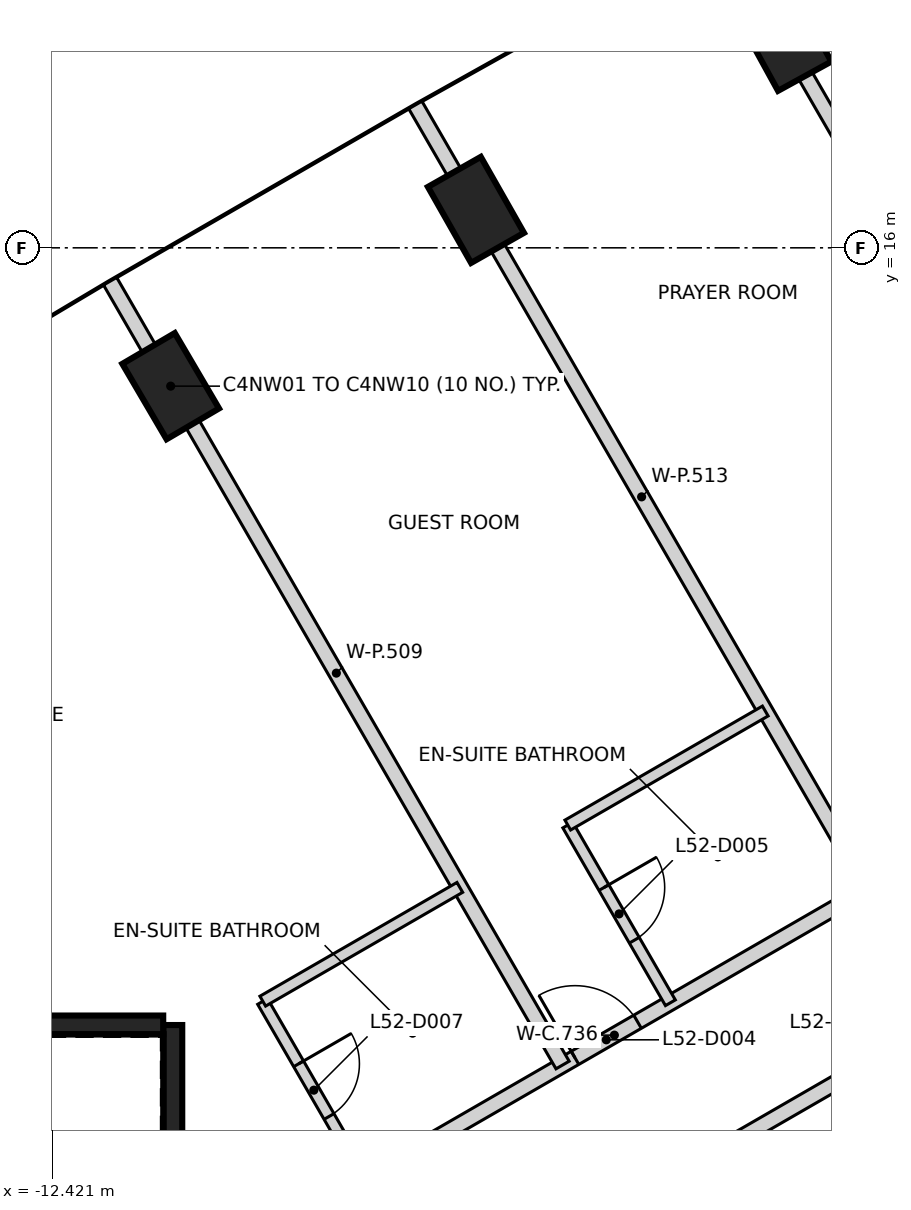
"""IFC4 building model, lengths in metres.
Left out: names, types, materials, properties, quantities, classifications, styles, units other than length and angle.
Written with IfcOpenShell. Run it as: python <this file> out.ifc"""

import sys

from ifc_helpers import new_model, si_unit, direction, frame, frame_2d, origin, origin_2d, place, context, subcontext, project, spatial, rectangle, extrude, element, fill, save


model = new_model("IFC4")
c1 = context("Model", 3, precision=1e-05, world=origin(), true_north=direction((0.0, 1.0)))
c2 = subcontext(c1, "Body", "Model", "MODEL_VIEW")
j1 = project(units=[si_unit("LENGTHUNIT", "METRE"), si_unit("PLANEANGLEUNIT", "RADIAN")], contexts=[c1])
p1 = place(None, origin())
s1 = spatial("IfcSite", under=j1, at=p1, CompositionType="ELEMENT")
p2 = place(p1, origin())
s2 = spatial("IfcBuilding", under=s1, at=p2, CompositionType="ELEMENT")
p3 = place(p2, frame((0.0, 0.0, 208.0)))
s3 = spatial("IfcBuildingStorey", under=s2, at=p3, CompositionType="ELEMENT", Elevation=208.0)
for number, where, z_axis, x_axis in (
    (1, (-2.8, 18.762, -0.35), (0.0, 0.0, 1.0), (-0.482, 0.876, 0.0)),
    (2, (-6.848, 16.499, -0.35), (0.0, 0.0, 1.0), (-0.494, 0.87, 0.0)),
    (3, (-10.864, 14.18, -0.35), (0.0, 0.0, 1.0), (-0.506, 0.862, 0.0)),
):
    element("IfcColumn", number, at=place(p3, frame(where, z_axis=z_axis, x_axis=x_axis)), inside=s3, PredefinedType="COLUMN", context=c2, shape_type="SweptSolid", body=[
        extrude(rectangle(XDim=1.15, YDim=0.8, at=origin_2d()), origin(), (0.0, 0.0, 1.0), 2.736),
    ])
p4 = place(p3, frame((-10.837, 5.775, 0.0), z_axis=(0.0, 0.0, 1.0), x_axis=(0.0, -1.0, 0.0)))
e4 = element("IfcWall", 4, at=p4, inside=s3, PredefinedType="SHEAR", context=c2, shape_type="SweptSolid", body=[
    extrude(rectangle(XDim=11.55, YDim=0.25, at=frame_2d((5.775, 0.0))), origin(), (0.0, 0.0, 1.0), 3.2),
])
p5 = place(p4, frame((10.025, 0.0, 0.0)))
e5 = element("IfcOpeningElement", 5, at=p5, cuts=e4, PredefinedType="OPENING", context=c2, shape_type="SweptSolid", body=[
    extrude(rectangle(XDim=1.2, YDim=2.1, at=frame_2d((0.6, 1.05))), frame((0.0, 0.135, 0.0), z_axis=(0.0, -1.0, 0.0), x_axis=(1.0, 0.0, 0.0)), (0.0, 0.0, 1.0), 0.27),
])
p6 = place(p4, frame((8.725, 0.0, 0.0)))
e6 = element("IfcOpeningElement", 6, at=p6, cuts=e4, PredefinedType="OPENING", context=c2, shape_type="SweptSolid", body=[
    extrude(rectangle(XDim=1.2, YDim=2.1, at=frame_2d((0.6, 1.05))), frame((0.0, 0.135, 0.0), z_axis=(0.0, -1.0, 0.0), x_axis=(1.0, 0.0, 0.0)), (0.0, 0.0, 1.0), 0.27),
])
p7 = place(p3, frame((-16.472, 5.775, 0.0), z_axis=(0.0, 0.0, 1.0), x_axis=(1.0, 0.0, 0.0)))
e7 = element("IfcWall", 7, at=p7, inside=s3, PredefinedType="SHEAR", context=c2, shape_type="SweptSolid", body=[
    extrude(rectangle(XDim=5.51, YDim=0.25, at=frame_2d((2.755, 0.0))), origin(), (0.0, 0.0, 1.0), 3.2),
])
p8 = place(p3, frame((-10.652, 2.394, 0.0), z_axis=(0.0, 0.0, 1.0), x_axis=(0.866016271077, 0.500015817979, 0.0)))
e8 = element("IfcWall", 8, at=p8, inside=s3, PredefinedType="PARTITIONING", context=c2, shape_type="SweptSolid", body=[
    extrude(rectangle(XDim=12.991, YDim=0.2, at=frame_2d((6.495, 0.0))), origin(), (0.0, 0.0, 1.0), 3.2),
])
p9 = place(p8, frame((5.898, 0.0, 0.0)))
e9 = element("IfcOpeningElement", 9, at=p9, cuts=e8, PredefinedType="OPENING", context=c2, shape_type="SweptSolid", body=[
    extrude(rectangle(XDim=0.95, YDim=2.1, at=frame_2d((0.475, 1.05))), frame((0.0, 0.11, 0.0), z_axis=(0.0, -1.0, 0.0), x_axis=(1.0, 0.0, 0.0)), (0.0, 0.0, 1.0), 0.22),
])
p10 = place(p8, frame((1.571, 0.0, 0.0)))
e10 = element("IfcOpeningElement", 10, at=p10, cuts=e8, PredefinedType="OPENING", context=c2, shape_type="SweptSolid", body=[
    extrude(rectangle(XDim=0.95, YDim=2.1, at=frame_2d((0.475, 1.05))), frame((0.0, 0.11, 0.0), z_axis=(0.0, -1.0, 0.0), x_axis=(1.0, 0.0, 0.0)), (0.0, 0.0, 1.0), 0.22),
])
p11 = place(p3, frame((-4.718, 3.511, 0.0), z_axis=(0.0, 0.0, 1.0), x_axis=(0.865989775611, 0.500061704731, 0.0)))
e11 = element("IfcWall", 11, at=p11, inside=s3, PredefinedType="PARTITIONING", context=c2, shape_type="SweptSolid", body=[
    extrude(rectangle(XDim=9.157, YDim=0.2, at=frame_2d((4.579, 0.0))), origin(), (0.0, 0.0, 1.0), 3.2),
])
p12 = place(p11, frame((4.128, 0.0, 0.0)))
e12 = element("IfcOpeningElement", 12, at=p12, cuts=e11, PredefinedType="OPENING", context=c2, shape_type="SweptSolid", body=[
    extrude(rectangle(XDim=0.9, YDim=2.1, at=frame_2d((0.45, 1.05))), frame((0.0, 0.11, 0.0), z_axis=(0.0, -1.0, 0.0), x_axis=(1.0, 0.0, 0.0)), (0.0, 0.0, 1.0), 0.22),
])
p13 = place(p3, frame((-11.661, 15.561, 0.0), z_axis=(0.0, 0.0, 1.0), x_axis=(0.499960887391, -0.866047984282, 0.0)))
e13 = element("IfcWall", 13, at=p13, inside=s3, PredefinedType="PARTITIONING", context=c2, shape_type="SweptSolid", body=[
    extrude(rectangle(XDim=11.907, YDim=0.2, at=frame_2d((5.953, 0.0))), origin(), (0.0, 0.0, 1.0), 3.2),
])
p14 = place(p3, frame((-7.646, 17.879, 0.0), z_axis=(0.0, 0.0, 1.0), x_axis=(0.500042538917, -0.866000842536, 0.0)))
e14 = element("IfcWall", 14, at=p14, inside=s3, PredefinedType="PARTITIONING", context=c2, shape_type="SweptSolid", body=[
    extrude(rectangle(XDim=11.906, YDim=0.2, at=frame_2d((5.953, 0.0))), origin(), (0.0, 0.0, 1.0), 3.2),
])
p15 = place(p3, frame((-4.318, 2.819, 0.0), z_axis=(0.0, 0.0, 1.0), x_axis=(0.866038843867, 0.499976720371, 0.0)))
e15 = element("IfcWall", 15, at=p15, inside=s3, PredefinedType="PARTITIONING", context=c2, shape_type="SweptSolid", body=[
    extrude(rectangle(XDim=8.45, YDim=0.2, at=frame_2d((4.225, 0.0))), origin(), (0.0, 0.0, 1.0), 3.2),
])
p16 = place(p3, frame((-3.598, 20.142, 0.0), z_axis=(0.0, 0.0, 1.0), x_axis=(0.499981732209, -0.866035950442, 0.0)))
e16 = element("IfcWall", 16, at=p16, inside=s3, PredefinedType="PARTITIONING", context=c2, shape_type="SweptSolid", body=[
    extrude(rectangle(XDim=6.82, YDim=0.2, at=frame_2d((3.41, 0.0))), origin(), (0.0, 0.0, 1.0), 3.2),
])
p17 = place(p3, frame((-9.655, 6.085, 0.0), z_axis=(0.0, 0.0, 1.0), x_axis=(0.500129820725, -0.865950438779, 0.0)))
e17 = element("IfcWall", 17, at=p17, inside=s3, PredefinedType="PARTITIONING", context=c2, shape_type="SweptSolid", body=[
    extrude(rectangle(XDim=2.698, YDim=0.15, at=frame_2d((1.349, 0.0))), origin(), (0.0, 0.0, 1.0), 3.2),
])
p18 = place(p17, frame((0.948, 0.0, 0.0)))
e18 = element("IfcOpeningElement", 18, at=p18, cuts=e17, PredefinedType="OPENING", context=c2, shape_type="SweptSolid", body=[
    extrude(rectangle(XDim=0.8, YDim=2.1, at=frame_2d((0.4, 1.05))), frame((0.0, 0.085, 0.0), z_axis=(0.0, -1.0, 0.0), x_axis=(1.0, 0.0, 0.0)), (0.0, 0.0, 1.0), 0.17),
])
p19 = place(p3, frame((-9.653, 6.089, 0.0), z_axis=(0.0, 0.0, 1.0), x_axis=(0.866021254674, 0.500007186402, 0.0)))
e19 = element("IfcWall", 19, at=p19, inside=s3, PredefinedType="PARTITIONING", context=c2, shape_type="SweptSolid", body=[
    extrude(rectangle(XDim=2.994, YDim=0.15, at=frame_2d((1.497, 0.0))), origin(), (0.0, 0.0, 1.0), 3.2),
])
p20 = place(p3, frame((-5.64, 8.406, 0.0), z_axis=(0.0, 0.0, 1.0), x_axis=(0.50001992892, -0.866013897511, 0.0)))
e20 = element("IfcWall", 20, at=p20, inside=s3, PredefinedType="PARTITIONING", context=c2, shape_type="SweptSolid", body=[
    extrude(rectangle(XDim=2.7, YDim=0.15, at=frame_2d((1.35, 0.0))), origin(), (0.0, 0.0, 1.0), 3.2),
])
p21 = place(p20, frame((0.95, 0.0, 0.0)))
e21 = element("IfcOpeningElement", 21, at=p21, cuts=e20, PredefinedType="OPENING", context=c2, shape_type="SweptSolid", body=[
    extrude(rectangle(XDim=0.8, YDim=2.1, at=frame_2d((0.4, 1.05))), frame((0.0, 0.085, 0.0), z_axis=(0.0, -1.0, 0.0), x_axis=(1.0, 0.0, 0.0)), (0.0, 0.0, 1.0), 0.17),
])
p22 = place(p3, frame((-5.64, 8.406, 0.0), z_axis=(0.0, 0.0, 1.0), x_axis=(0.866010750942, 0.50002537861, 0.0)))
e22 = element("IfcWall", 22, at=p22, inside=s3, PredefinedType="PARTITIONING", context=c2, shape_type="SweptSolid", body=[
    extrude(rectangle(XDim=3.0, YDim=0.15, at=frame_2d((1.5, 0.0))), origin(), (0.0, 0.0, 1.0), 3.2),
])
p23 = place(p9, origin())
e23 = element("IfcDoor", 23, at=p23, inside=s3, OperationType="SINGLE_SWING_LEFT", PredefinedType="DOOR", context=c2, shape_type="SweptSolid", body=[
    extrude(rectangle(XDim=0.95, YDim=2.1, at=frame_2d((0.475, 1.05))), frame((0.0, 0.025, 0.0), z_axis=(0.0, -1.0, 0.0), x_axis=(1.0, 0.0, 0.0)), (0.0, 0.0, 1.0), 0.05),
])
fill(e9, e23)
p24 = place(p21, origin())
e24 = element("IfcDoor", 24, at=p24, inside=s3, OperationType="SINGLE_SWING_LEFT", PredefinedType="DOOR", context=c2, shape_type="SweptSolid", body=[
    extrude(rectangle(XDim=0.8, YDim=2.1, at=frame_2d((0.4, 1.05))), frame((0.0, 0.025, 0.0), z_axis=(0.0, -1.0, 0.0), x_axis=(1.0, 0.0, 0.0)), (0.0, 0.0, 1.0), 0.05),
])
fill(e21, e24)
p25 = place(p18, frame((0.8, 0.0, 0.0), z_axis=(0.0, 0.0, 1.0), x_axis=(-1.0, 0.0, 0.0)))
e25 = element("IfcDoor", 25, at=p25, inside=s3, OperationType="SINGLE_SWING_LEFT", PredefinedType="DOOR", context=c2, shape_type="SweptSolid", body=[
    extrude(rectangle(XDim=0.8, YDim=2.1, at=frame_2d((0.4, 1.05))), frame((0.0, 0.025, 0.0), z_axis=(0.0, -1.0, 0.0), x_axis=(1.0, 0.0, 0.0)), (0.0, 0.0, 1.0), 0.05),
])
fill(e18, e25)
save(model, sys.argv[1])
